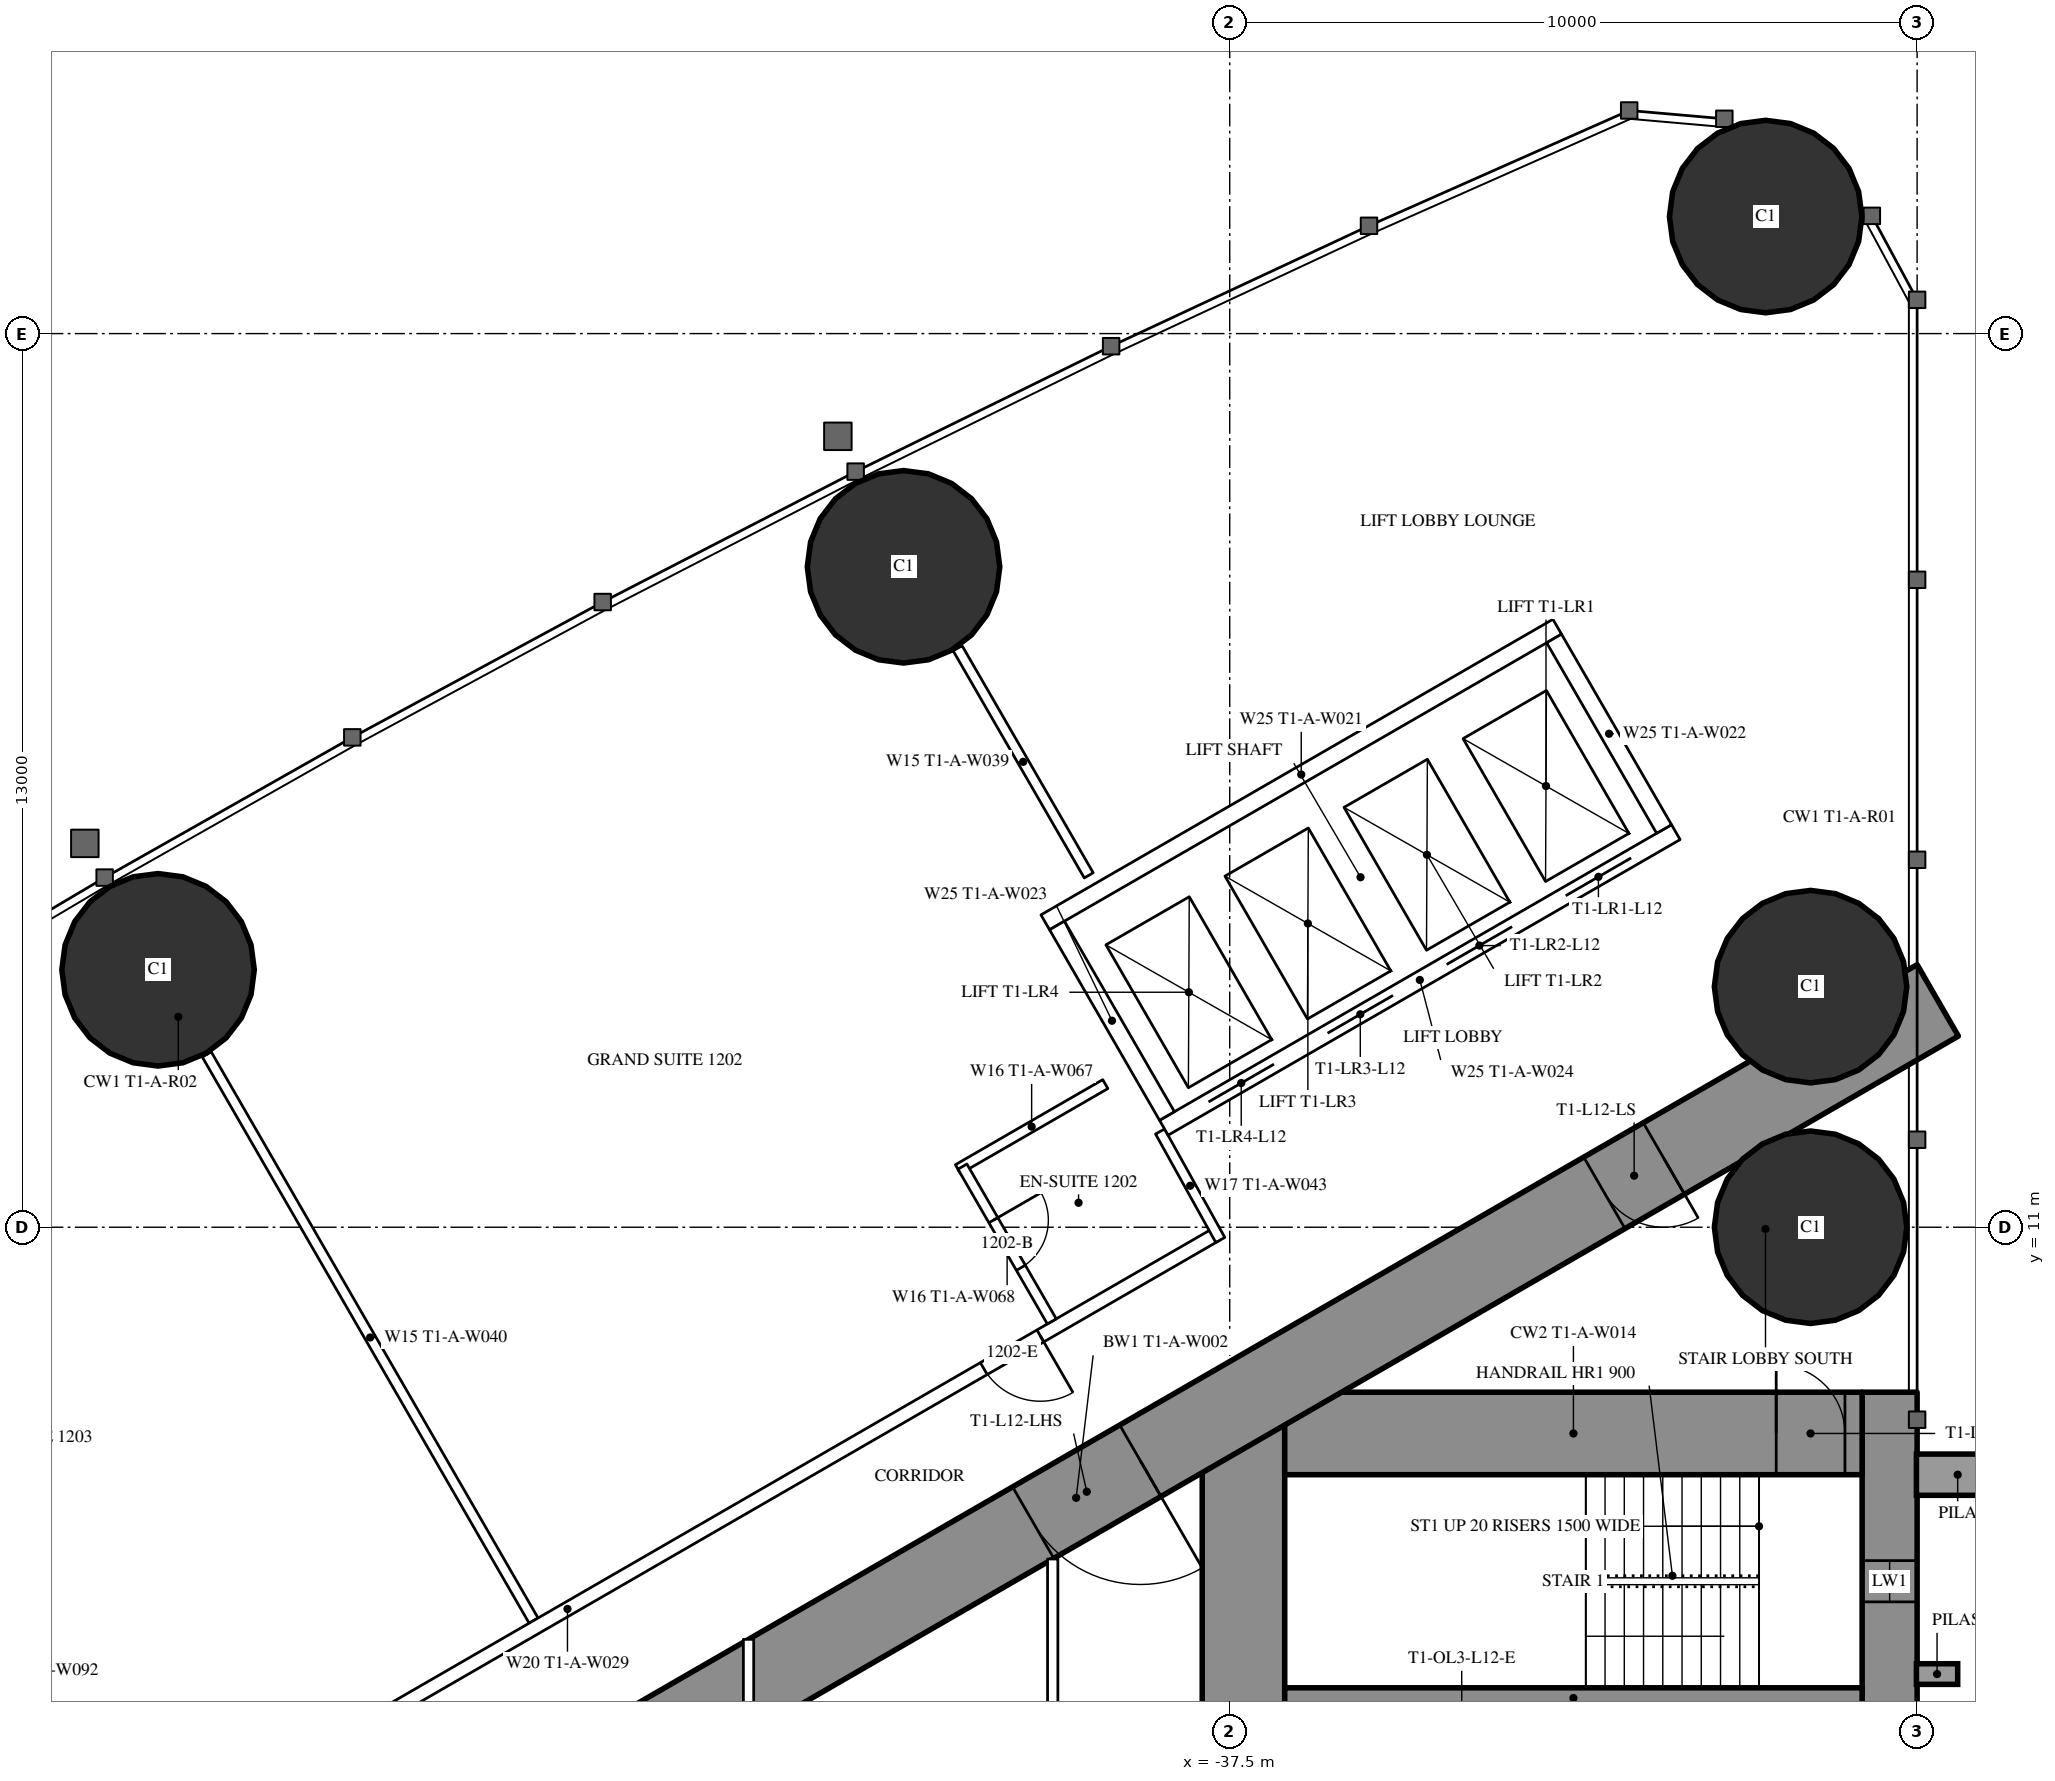
"""IFC4 building model, lengths in metres.
Left out: names, types, materials, properties, quantities, classifications, styles, units other than length and angle.
Written with IfcOpenShell. Run it as: python <this file> out.ifc"""

import sys

from ifc_helpers import new_model, si_unit, direction, frame, frame_2d, origin, origin_2d, place, context, subcontext, project, spatial, rectangle, hollow_circle, extrude, element, fill, save


model = new_model("IFC4")
c1 = context("Model", 3, precision=1e-05, world=origin(), true_north=direction((0.0, 1.0)))
c2 = subcontext(c1, "Body", "Model", "MODEL_VIEW")
j1 = project(units=[si_unit("LENGTHUNIT", "METRE"), si_unit("PLANEANGLEUNIT", "RADIAN")], contexts=[c1])
p1 = place(None, origin())
s1 = spatial("IfcSite", under=j1, at=p1, CompositionType="ELEMENT")
p2 = place(p1, origin())
s2 = spatial("IfcBuilding", under=s1, at=p2, CompositionType="ELEMENT")
p3 = place(p2, frame((0.0, 0.0, 49.5)))
s3 = spatial("IfcBuildingStorey", under=s2, at=p3, CompositionType="ELEMENT", Elevation=49.5)
for number, where, z_axis, x_axis in (
    (1, (-29.703, 25.703, 0.0), (0.0, 0.0, 1.0), (1.0, 0.0, 0.0)),
    (2, (-29.05, 11.0, 0.0), (0.0, 0.0, 1.0), (1.0, 0.0, 0.0)),
    (3, (-29.05, 14.5, 0.0), (0.0, 0.0, 1.0), (1.0, 0.0, 0.0)),
    (4, (-42.245, 20.607, 0.0), (0.0, 0.0, 1.0), (1.0, 0.0, 0.0)),
    (5, (-53.09, 14.745, 0.0), (0.0, 0.0, 1.0), (1.0, 0.0, 0.0)),
):
    element("IfcColumn", number, at=place(p3, frame(where, z_axis=z_axis, x_axis=x_axis)), inside=s3, PredefinedType="COLUMN", context=c2, shape_type="SweptSolid", body=[
        extrude(hollow_circle(Radius=1.4, WallThickness=0.12, at=origin_2d()), origin(), (0.0, 0.0, 1.0), 3.5),
    ])
p4 = place(p3, frame((-27.9, 8.6, 0.0), z_axis=(0.0, 0.0, 1.0), x_axis=(0.0, -1.0, 0.0)))
e6 = element("IfcWall", 6, at=p4, inside=s3, PredefinedType="SHEAR", context=c2, shape_type="SweptSolid", body=[
    extrude(rectangle(XDim=17.2, YDim=0.8, at=frame_2d((8.6, 0.0))), origin(), (0.0, 0.0, 1.0), 3.5),
])
p5 = place(p4, frame((2.45, 0.0, 0.6)))
e7 = element("IfcOpeningElement", 7, at=p5, cuts=e6, PredefinedType="OPENING", context=c2, shape_type="SweptSolid", body=[
    extrude(rectangle(XDim=0.6, YDim=2.1, at=frame_2d((0.3, 1.05))), frame((0.0, 0.41, 0.0), z_axis=(0.0, -1.0, 0.0), x_axis=(1.0, 0.0, 0.0)), (0.0, 0.0, 1.0), 0.82),
])
p6 = place(p4, frame((14.15, 0.0, 0.6)))
e8 = element("IfcOpeningElement", 8, at=p6, cuts=e6, PredefinedType="OPENING", context=c2, shape_type="SweptSolid", body=[
    extrude(rectangle(XDim=0.6, YDim=2.1, at=frame_2d((0.3, 1.05))), frame((0.0, 0.41, 0.0), z_axis=(0.0, -1.0, 0.0), x_axis=(1.0, 0.0, 0.0)), (0.0, 0.0, 1.0), 0.82),
])
p7 = place(p3, frame((-37.3, 8.6, 0.0), z_axis=(0.0, 0.0, 1.0), x_axis=(0.0, -1.0, 0.0)))
e9 = element("IfcWall", 9, at=p7, inside=s3, PredefinedType="SHEAR", context=c2, shape_type="SweptSolid", body=[
    extrude(rectangle(XDim=17.2, YDim=1.2, at=frame_2d((8.6, 0.0))), origin(), (0.0, 0.0, 1.0), 3.5),
])
p8 = place(p7, frame((7.7, 0.0, 0.0)))
e10 = element("IfcOpeningElement", 10, at=p8, cuts=e9, PredefinedType="OPENING", context=c2, shape_type="SweptSolid", body=[
    extrude(rectangle(XDim=1.8, YDim=2.2, at=frame_2d((0.9, 1.1))), frame((0.0, 0.61, 0.0), z_axis=(0.0, -1.0, 0.0), x_axis=(1.0, 0.0, 0.0)), (0.0, 0.0, 1.0), 1.22),
])
p9 = place(p3, frame((-28.3, 8.0, 0.0), z_axis=(0.0, 0.0, 1.0), x_axis=(-1.0, 0.0, 0.0)))
e11 = element("IfcWall", 11, at=p9, inside=s3, PredefinedType="SHEAR", context=c2, shape_type="SweptSolid", body=[
    extrude(rectangle(XDim=8.4, YDim=1.2, at=frame_2d((4.2, 0.0))), origin(), (0.0, 0.0, 1.0), 3.5),
])
p10 = place(p9, frame((0.25, 0.0, 0.0)))
e12 = element("IfcOpeningElement", 12, at=p10, cuts=e11, PredefinedType="OPENING", context=c2, shape_type="SweptSolid", body=[
    extrude(rectangle(XDim=1.0, YDim=2.2, at=frame_2d((0.5, 1.1))), frame((0.0, 0.61, 0.0), z_axis=(0.0, -1.0, 0.0), x_axis=(1.0, 0.0, 0.0)), (0.0, 0.0, 1.0), 1.22),
])
p11 = place(p3, frame((-28.3, 4.15, 0.0), z_axis=(0.0, 0.0, 1.0), x_axis=(-1.0, 0.0, 0.0)))
e13 = element("IfcWall", 13, at=p11, inside=s3, PredefinedType="SHEAR", context=c2, shape_type="SweptSolid", body=[
    extrude(rectangle(XDim=8.4, YDim=0.3, at=frame_2d((4.2, 0.0))), origin(), (0.0, 0.0, 1.0), 3.5),
])
p12 = place(p3, frame((-27.2, 14.3, 0.0), z_axis=(0.0, 0.0, 1.0), x_axis=(-0.866026593062, -0.499997940104, 0.0)))
e14 = element("IfcWall", 14, at=p12, inside=s3, PredefinedType="SHEAR", context=c2, shape_type="SweptSolid", body=[
    extrude(rectangle(XDim=28.946, YDim=1.2, at=frame_2d((14.473, 0.0))), origin(), (0.0, 0.0, 1.0), 3.5),
])
p13 = place(p12, frame((4.6, 0.0, 0.0)))
e15 = element("IfcOpeningElement", 15, at=p13, cuts=e14, PredefinedType="OPENING", context=c2, shape_type="SweptSolid", body=[
    extrude(rectangle(XDim=1.0, YDim=2.2, at=frame_2d((0.5, 1.1))), frame((0.0, 0.61, 0.0), z_axis=(0.0, -1.0, 0.0), x_axis=(1.0, 0.0, 0.0)), (0.0, 0.0, 1.0), 1.22),
])
p14 = place(p12, frame((13.395, 0.0, 0.0)))
e16 = element("IfcOpeningElement", 16, at=p14, cuts=e14, PredefinedType="OPENING", context=c2, shape_type="SweptSolid", body=[
    extrude(rectangle(XDim=1.8, YDim=2.2, at=frame_2d((0.9, 1.1))), frame((0.0, 0.61, 0.0), z_axis=(0.0, -1.0, 0.0), x_axis=(1.0, 0.0, 0.0)), (0.0, 0.0, 1.0), 1.22),
])
p15 = place(p3, frame((-47.627, 5.278, 0.0), z_axis=(0.0, 0.0, 1.0), x_axis=(-0.500009844318, 0.86601972009, 0.0)))
e17 = element("IfcWall", 17, at=p15, inside=s3, PredefinedType="PARTITIONING", context=c2, shape_type="SweptSolid", body=[
    extrude(rectangle(XDim=9.51, YDim=0.15, at=frame_2d((4.755, 0.0))), origin(), (0.0, 0.0, 1.0), 2.25),
])
p16 = place(p3, frame((-39.551, 16.119, 0.0), z_axis=(0.0, 0.0, 1.0), x_axis=(-0.500014214979, 0.866017196607, 0.0)))
e18 = element("IfcWall", 18, at=p16, inside=s3, PredefinedType="PARTITIONING", context=c2, shape_type="SweptSolid", body=[
    extrude(rectangle(XDim=3.815, YDim=0.15, at=frame_2d((1.907, 0.0))), origin(), (0.0, 0.0, 1.0), 3.25),
])
p17 = place(p3, frame((-37.7, 10.894, 0.0), z_axis=(0.0, 0.0, 1.0), x_axis=(-0.866027905338, -0.499995667157, 0.0)))
e19 = element("IfcWall", 19, at=p17, inside=s3, PredefinedType="PARTITIONING", context=c2, shape_type="SweptSolid", body=[
    extrude(rectangle(XDim=21.787, YDim=0.2, at=frame_2d((10.894, 0.0))), origin(), (0.0, 0.0, 1.0), 3.25),
])
p18 = place(p17, frame((20.237, 0.0, 0.0)))
e20 = element("IfcOpeningElement", 20, at=p18, cuts=e19, PredefinedType="OPENING", context=c2, shape_type="SweptSolid", body=[
    extrude(rectangle(XDim=0.95, YDim=2.2, at=frame_2d((0.475, 1.1))), frame((0.0, 0.11, 0.0), z_axis=(0.0, -1.0, 0.0), x_axis=(1.0, 0.0, 0.0)), (0.0, 0.0, 1.0), 0.22),
])
p19 = place(p17, frame((2.95, 0.0, 0.0)))
e21 = element("IfcOpeningElement", 21, at=p19, cuts=e19, PredefinedType="OPENING", context=c2, shape_type="SweptSolid", body=[
    extrude(rectangle(XDim=0.95, YDim=2.2, at=frame_2d((0.475, 1.1))), frame((0.0, 0.11, 0.0), z_axis=(0.0, -1.0, 0.0), x_axis=(1.0, 0.0, 0.0)), (0.0, 0.0, 1.0), 0.22),
])
p20 = place(p3, frame((-38.513, 12.392, 0.0), z_axis=(0.0, 0.0, 1.0), x_axis=(0.485585508183, -0.874189175317, 0.0)))
e22 = element("IfcWall", 22, at=p20, inside=s3, PredefinedType="PARTITIONING", context=c2, shape_type="SweptSolid", body=[
    extrude(rectangle(XDim=1.805, YDim=0.15, at=frame_2d((0.902, 0.0))), origin(), (0.0, 0.0, 1.0), 3.25),
])
p21 = place(p3, frame((-39.31, 13.082, 0.0), z_axis=(0.0, 0.0, 1.0), x_axis=(-0.866031185235, -0.4999899861, 0.0)))
e23 = element("IfcWall", 23, at=p21, inside=s3, PredefinedType="PARTITIONING", context=c2, shape_type="SweptSolid", body=[
    extrude(rectangle(XDim=2.475, YDim=0.15, at=frame_2d((1.238, 0.0))), origin(), (0.0, 0.0, 1.0), 3.25),
])
p22 = place(p3, frame((-40.088, 9.63, 0.0), z_axis=(0.0, 0.0, 1.0), x_axis=(-0.500006934395, 0.866021400173, 0.0)))
e24 = element("IfcWall", 24, at=p22, inside=s3, PredefinedType="PARTITIONING", context=c2, shape_type="SweptSolid", body=[
    extrude(rectangle(XDim=2.6, YDim=0.15, at=frame_2d((1.3, 0.0))), origin(), (0.0, 0.0, 1.0), 3.25),
])
p23 = place(p22, frame((0.9, 0.0, 0.0)))
e25 = element("IfcOpeningElement", 25, at=p23, cuts=e24, PredefinedType="OPENING", context=c2, shape_type="SweptSolid", body=[
    extrude(rectangle(XDim=0.8, YDim=2.2, at=frame_2d((0.4, 1.1))), frame((0.0, 0.085, 0.0), z_axis=(0.0, -1.0, 0.0), x_axis=(1.0, 0.0, 0.0)), (0.0, 0.0, 1.0), 0.17),
])
p24 = place(p3, frame((-40.075, 6.174, 0.0), z_axis=(0.0, 0.0, 1.0), x_axis=(0.0, -1.0, 0.0)))
e26 = element("IfcWall", 26, at=p24, inside=s3, PredefinedType="PARTITIONING", context=c2, shape_type="SweptSolid", body=[
    extrude(rectangle(XDim=7.374, YDim=0.15, at=frame_2d((3.687, 0.0))), origin(), (0.0, 0.0, 1.0), 3.25),
])
p25 = place(p24, frame((2.787, 0.0, 0.0)))
e27 = element("IfcOpeningElement", 27, at=p25, cuts=e26, PredefinedType="OPENING", context=c2, shape_type="SweptSolid", body=[
    extrude(rectangle(XDim=1.8, YDim=2.2, at=frame_2d((0.9, 1.1))), frame((0.0, 0.085, 0.0), z_axis=(0.0, -1.0, 0.0), x_axis=(1.0, 0.0, 0.0)), (0.0, 0.0, 1.0), 0.17),
])
p26 = place(p3, frame((-44.5, 5.005, 0.0), z_axis=(0.0, 0.0, 1.0), x_axis=(0.0, -1.0, 0.0)))
e28 = element("IfcWall", 28, at=p26, inside=s3, PredefinedType="PARTITIONING", context=c2, shape_type="SweptSolid", body=[
    extrude(rectangle(XDim=10.009, YDim=0.15, at=frame_2d((5.005, 0.0))), origin(), (0.0, 0.0, 1.0), 2.45),
])
p27 = place(p26, frame((2.002, 0.0, 0.0)))
e29 = element("IfcOpeningElement", 29, at=p27, cuts=e28, PredefinedType="OPENING", context=c2, shape_type="SweptSolid", body=[
    extrude(rectangle(XDim=1.0, YDim=2.2, at=frame_2d((0.5, 1.1))), frame((0.0, 0.085, 0.0), z_axis=(0.0, -1.0, 0.0), x_axis=(1.0, 0.0, 0.0)), (0.0, 0.0, 1.0), 0.17),
])
p28 = place(p26, frame((7.007, 0.0, 0.0)))
e30 = element("IfcOpeningElement", 30, at=p28, cuts=e28, PredefinedType="OPENING", context=c2, shape_type="SweptSolid", body=[
    extrude(rectangle(XDim=1.0, YDim=2.2, at=frame_2d((0.5, 1.1))), frame((0.0, 0.085, 0.0), z_axis=(0.0, -1.0, 0.0), x_axis=(1.0, 0.0, 0.0)), (0.0, 0.0, 1.0), 0.17),
])
p29 = place(p3, frame((-31.01, 16.747, 0.0), z_axis=(0.0, 0.0, 1.0), x_axis=(-0.866028165386, -0.499995216735, 0.0)))
e31 = element("IfcWall", 31, at=p29, inside=s3, PredefinedType="PARTITIONING", context=c2, shape_type="SweptSolid", body=[
    extrude(rectangle(XDim=8.6, YDim=0.25, at=frame_2d((4.3, 0.0))), origin(), (0.0, 0.0, 1.0), 3.25),
])
p30 = place(p29, frame((0.75, 0.0, 0.0)))
e32 = element("IfcOpeningElement", 32, at=p30, cuts=e31, PredefinedType="OPENING", context=c2, shape_type="SweptSolid", body=[
    extrude(rectangle(XDim=1.1, YDim=2.2, at=frame_2d((0.55, 1.1))), frame((0.0, 0.135, 0.0), z_axis=(0.0, -1.0, 0.0), x_axis=(1.0, 0.0, 0.0)), (0.0, 0.0, 1.0), 0.27),
])
p31 = place(p29, frame((2.75, 0.0, 0.0)))
e33 = element("IfcOpeningElement", 33, at=p31, cuts=e31, PredefinedType="OPENING", context=c2, shape_type="SweptSolid", body=[
    extrude(rectangle(XDim=1.1, YDim=2.2, at=frame_2d((0.55, 1.1))), frame((0.0, 0.135, 0.0), z_axis=(0.0, -1.0, 0.0), x_axis=(1.0, 0.0, 0.0)), (0.0, 0.0, 1.0), 0.27),
])
p32 = place(p29, frame((4.75, 0.0, 0.0)))
e34 = element("IfcOpeningElement", 34, at=p32, cuts=e31, PredefinedType="OPENING", context=c2, shape_type="SweptSolid", body=[
    extrude(rectangle(XDim=1.1, YDim=2.2, at=frame_2d((0.55, 1.1))), frame((0.0, 0.135, 0.0), z_axis=(0.0, -1.0, 0.0), x_axis=(1.0, 0.0, 0.0)), (0.0, 0.0, 1.0), 0.27),
])
p33 = place(p29, frame((6.75, 0.0, 0.0)))
e35 = element("IfcOpeningElement", 35, at=p33, cuts=e31, PredefinedType="OPENING", context=c2, shape_type="SweptSolid", body=[
    extrude(rectangle(XDim=1.1, YDim=2.2, at=frame_2d((0.55, 1.1))), frame((0.0, 0.135, 0.0), z_axis=(0.0, -1.0, 0.0), x_axis=(1.0, 0.0, 0.0)), (0.0, 0.0, 1.0), 0.27),
])
p34 = place(p3, frame((-32.736, 19.736, 0.0), z_axis=(0.0, 0.0, 1.0), x_axis=(-0.866028165386, -0.499995216735, 0.0)))
e36 = element("IfcWall", 36, at=p34, inside=s3, PredefinedType="PARTITIONING", context=c2, shape_type="SweptSolid", body=[
    extrude(rectangle(XDim=8.6, YDim=0.25, at=frame_2d((4.3, 0.0))), origin(), (0.0, 0.0, 1.0), 3.25),
])
p35 = place(p3, frame((-31.181, 16.793, 0.0), z_axis=(0.0, 0.0, 1.0), x_axis=(-0.499929347863, 0.866066190972, 0.0)))
e37 = element("IfcWall", 37, at=p35, inside=s3, PredefinedType="PARTITIONING", context=c2, shape_type="SweptSolid", body=[
    extrude(rectangle(XDim=3.201, YDim=0.25, at=frame_2d((1.6, 0.0))), origin(), (0.0, 0.0, 1.0), 3.25),
])
p36 = place(p3, frame((-38.413, 12.618, 0.0), z_axis=(0.0, 0.0, 1.0), x_axis=(-0.499872130319, 0.866099216793, 0.0)))
e38 = element("IfcWall", 38, at=p36, inside=s3, PredefinedType="PARTITIONING", context=c2, shape_type="SweptSolid", body=[
    extrude(rectangle(XDim=3.2, YDim=0.25, at=frame_2d((1.6, 0.0))), origin(), (0.0, 0.0, 1.0), 3.25),
])
p37 = place(p23, origin())
e39 = element("IfcDoor", 39, at=p37, inside=s3, OperationType="SINGLE_SWING_RIGHT", PredefinedType="DOOR", context=c2, shape_type="SweptSolid", body=[
    extrude(rectangle(XDim=0.8, YDim=2.2, at=frame_2d((0.4, 1.1))), frame((0.0, 0.025, 0.0), z_axis=(0.0, -1.0, 0.0), x_axis=(1.0, 0.0, 0.0)), (0.0, 0.0, 1.0), 0.05),
])
fill(e25, e39)
p38 = place(p19, origin())
e40 = element("IfcDoor", 40, at=p38, inside=s3, OperationType="SINGLE_SWING_LEFT", PredefinedType="DOOR", context=c2, shape_type="SweptSolid", body=[
    extrude(rectangle(XDim=0.95, YDim=2.2, at=frame_2d((0.475, 1.1))), frame((0.0, 0.025, 0.0), z_axis=(0.0, -1.0, 0.0), x_axis=(1.0, 0.0, 0.0)), (0.0, 0.0, 1.0), 0.05),
])
fill(e21, e40)
p39 = place(p13, origin())
e41 = element("IfcDoor", 41, at=p39, inside=s3, OperationType="SINGLE_SWING_LEFT", PredefinedType="DOOR", context=c2, shape_type="SweptSolid", body=[
    extrude(rectangle(XDim=1.0, YDim=2.2, at=frame_2d((0.5, 1.1))), frame((0.0, 0.025, 0.0), z_axis=(0.0, -1.0, 0.0), x_axis=(1.0, 0.0, 0.0)), (0.0, 0.0, 1.0), 0.05),
])
fill(e15, e41)
p40 = place(p14, origin())
e42 = element("IfcDoor", 42, at=p40, inside=s3, OperationType="DOUBLE_DOOR_SINGLE_SWING", PredefinedType="DOOR", context=c2, shape_type="SweptSolid", body=[
    extrude(rectangle(XDim=1.8, YDim=2.2, at=frame_2d((0.9, 1.1))), frame((0.0, 0.025, 0.0), z_axis=(0.0, -1.0, 0.0), x_axis=(1.0, 0.0, 0.0)), (0.0, 0.0, 1.0), 0.05),
])
fill(e16, e42)
p41 = place(p10, origin())
e43 = element("IfcDoor", 43, at=p41, inside=s3, OperationType="SINGLE_SWING_RIGHT", PredefinedType="DOOR", context=c2, shape_type="SweptSolid", body=[
    extrude(rectangle(XDim=1.0, YDim=2.2, at=frame_2d((0.5, 1.1))), frame((0.0, 0.025, 0.0), z_axis=(0.0, -1.0, 0.0), x_axis=(1.0, 0.0, 0.0)), (0.0, 0.0, 1.0), 0.05),
])
fill(e12, e43)
p42 = place(p30, origin())
e44 = element("IfcDoor", 44, at=p42, inside=s3, OperationType="DOUBLE_DOOR_SLIDING", PredefinedType="USERDEFINED", context=c2, shape_type="SweptSolid", body=[
    extrude(rectangle(XDim=1.1, YDim=2.2, at=frame_2d((0.55, 1.1))), frame((0.0, 0.025, 0.0), z_axis=(0.0, -1.0, 0.0), x_axis=(1.0, 0.0, 0.0)), (0.0, 0.0, 1.0), 0.05),
])
fill(e32, e44)
p43 = place(p31, origin())
e45 = element("IfcDoor", 45, at=p43, inside=s3, OperationType="DOUBLE_DOOR_SLIDING", PredefinedType="USERDEFINED", context=c2, shape_type="SweptSolid", body=[
    extrude(rectangle(XDim=1.1, YDim=2.2, at=frame_2d((0.55, 1.1))), frame((0.0, 0.025, 0.0), z_axis=(0.0, -1.0, 0.0), x_axis=(1.0, 0.0, 0.0)), (0.0, 0.0, 1.0), 0.05),
])
fill(e33, e45)
p44 = place(p32, origin())
e46 = element("IfcDoor", 46, at=p44, inside=s3, OperationType="DOUBLE_DOOR_SLIDING", PredefinedType="USERDEFINED", context=c2, shape_type="SweptSolid", body=[
    extrude(rectangle(XDim=1.1, YDim=2.2, at=frame_2d((0.55, 1.1))), frame((0.0, 0.025, 0.0), z_axis=(0.0, -1.0, 0.0), x_axis=(1.0, 0.0, 0.0)), (0.0, 0.0, 1.0), 0.05),
])
fill(e34, e46)
p45 = place(p33, origin())
e47 = element("IfcDoor", 47, at=p45, inside=s3, OperationType="DOUBLE_DOOR_SLIDING", PredefinedType="USERDEFINED", context=c2, shape_type="SweptSolid", body=[
    extrude(rectangle(XDim=1.1, YDim=2.2, at=frame_2d((0.55, 1.1))), frame((0.0, 0.025, 0.0), z_axis=(0.0, -1.0, 0.0), x_axis=(1.0, 0.0, 0.0)), (0.0, 0.0, 1.0), 0.05),
])
fill(e35, e47)
p46 = place(p5, origin())
e48 = element("IfcWindow", 48, at=p46, inside=s3, PartitioningType="SINGLE_PANEL", PredefinedType="WINDOW", context=c2, shape_type="SweptSolid", body=[
    extrude(rectangle(XDim=0.6, YDim=2.1, at=frame_2d((0.3, 1.05))), frame((0.0, 0.03, 0.0), z_axis=(0.0, -1.0, 0.0), x_axis=(1.0, 0.0, 0.0)), (0.0, 0.0, 1.0), 0.06),
])
fill(e7, e48)
save(model, sys.argv[1])
